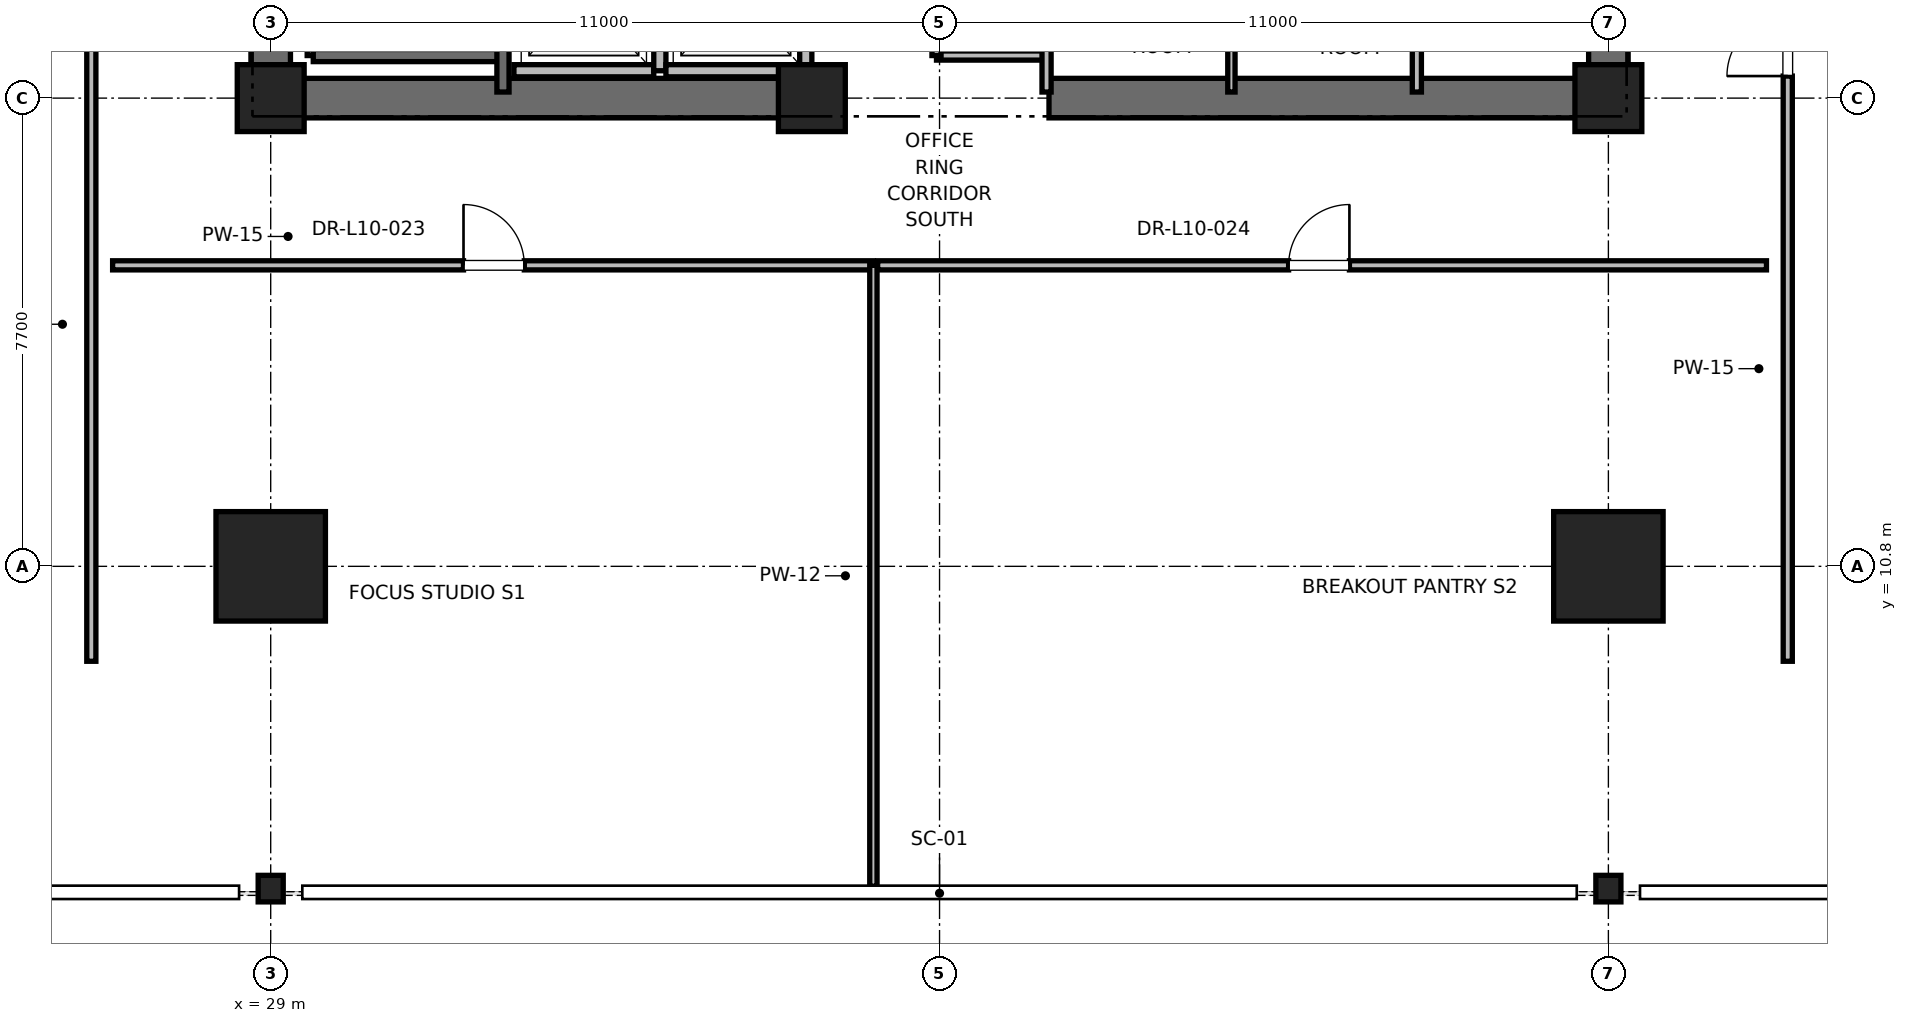
"""IFC4 building model, lengths in metres.
Left out: names, types, materials, properties, quantities, classifications, styles, units other than length and angle.
Written with IfcOpenShell. Run it as: python <this file> out.ifc"""

import sys

from ifc_helpers import new_model, si_unit, direction, frame, frame_2d, origin, origin_2d, place, context, subcontext, project, spatial, rectangle, i_section, extrude, element, fill, save


model = new_model("IFC4")
c1 = context("Model", 3, precision=1e-05, world=origin(), true_north=direction((0.0, 1.0)))
c2 = subcontext(c1, "Body", "Model", "MODEL_VIEW")
j1 = project(units=[si_unit("LENGTHUNIT", "METRE"), si_unit("PLANEANGLEUNIT", "RADIAN")], contexts=[c1])
p1 = place(None, origin())
s1 = spatial("IfcSite", under=j1, at=p1, CompositionType="ELEMENT")
p2 = place(p1, origin())
s2 = spatial("IfcBuilding", under=s1, at=p2, CompositionType="ELEMENT")
p3 = place(p2, frame((0.0, 0.0, 47.6)))
s3 = spatial("IfcBuildingStorey", under=s2, at=p3, CompositionType="ELEMENT", Elevation=47.6)
for number, where, z_axis, x_axis in (
    (1, (29.0, 10.8, 0.0), (0.0, 0.0, 1.0), (1.0, 0.0, 0.0)),
    (2, (51.0, 10.8, 0.0), (0.0, 0.0, 1.0), (1.0, 0.0, 0.0)),
):
    element("IfcColumn", number, at=place(p3, frame(where, z_axis=z_axis, x_axis=x_axis)), inside=s3, PredefinedType="COLUMN", context=c2, shape_type="SweptSolid", body=[
        extrude(rectangle(XDim=1.8, YDim=1.8, at=origin_2d()), origin(), (0.0, 0.0, 1.0), 4.0),
    ])
for number, where, z_axis, x_axis in (
    (3, (29.0, 5.5, 0.0), (0.0, 0.0, 1.0), (1.0, 0.0, 0.0)),
    (4, (51.0, 5.5, 0.0), (0.0, 0.0, 1.0), (1.0, 0.0, 0.0)),
):
    element("IfcColumn", number, at=place(p3, frame(where, z_axis=z_axis, x_axis=x_axis)), inside=s3, PredefinedType="COLUMN", context=c2, shape_type="SweptSolid", body=[
        extrude(i_section(OverallWidth=0.412, OverallDepth=0.437, WebThickness=0.036, FlangeThickness=0.058, FilletRadius=0.015, at=origin_2d()), origin(), (0.0, 0.0, 1.0), 4.0),
    ])
for number, where, z_axis, x_axis in (
    (5, (29.0, 18.5, 0.0), (0.0, 0.0, 1.0), (1.0, 0.0, 0.0)),
    (6, (51.0, 18.5, 0.0), (0.0, 0.0, 1.0), (1.0, 0.0, 0.0)),
    (7, (37.9, 18.5, 0.0), (0.0, 0.0, 1.0), (1.0, 0.0, 0.0)),
):
    element("IfcColumn", number, at=place(p3, frame(where, z_axis=z_axis, x_axis=x_axis)), inside=s3, PredefinedType="PILASTER", context=c2, shape_type="SweptSolid", body=[
        extrude(rectangle(XDim=1.1, YDim=1.1, at=origin_2d()), origin(), (0.0, 0.0, 1.0), 4.0),
    ])
for number, where, z_axis, x_axis in (
    (8, (29.0, 18.5, 0.0), (0.0, 0.0, 1.0), (1.0, 0.0, 0.0)),
    (9, (41.8, 18.5, 0.0), (0.0, 0.0, 1.0), (1.0, 0.0, 0.0)),
):
    element("IfcWall", number, at=place(p3, frame(where, z_axis=z_axis, x_axis=x_axis)), inside=s3, PredefinedType="SHEAR", context=c2, shape_type="SweptSolid", body=[
        extrude(rectangle(XDim=9.2, YDim=0.65, at=frame_2d((4.6, 0.0))), origin(), (0.0, 0.0, 1.0), 3.76),
    ])
p4 = place(p3, frame((29.0, 18.5, 0.0), z_axis=(0.0, 0.0, 1.0), x_axis=(0.0, 1.0, 0.0)))
e10 = element("IfcWall", 10, at=p4, inside=s3, PredefinedType="SHEAR", context=c2, shape_type="SweptSolid", body=[
    extrude(rectangle(XDim=8.8, YDim=0.65, at=frame_2d((4.4, 0.0))), origin(), (0.0, 0.0, 1.0), 3.76),
])
p5 = place(p3, frame((51.0, 18.5, 0.0), z_axis=(0.0, 0.0, 1.0), x_axis=(0.0, 1.0, 0.0)))
e11 = element("IfcWall", 11, at=p5, inside=s3, PredefinedType="SHEAR", context=c2, shape_type="SweptSolid", body=[
    extrude(rectangle(XDim=5.8, YDim=0.65, at=frame_2d((2.9, 0.0))), origin(), (0.0, 0.0, 1.0), 3.76),
])
p6 = place(p3, frame((29.7, 19.2, 0.0), z_axis=(0.0, 0.0, 1.0), x_axis=(0.0, 1.0, 0.0)))
e12 = element("IfcWall", 12, at=p6, inside=s3, PredefinedType="SOLIDWALL", context=c2, shape_type="SweptSolid", body=[
    extrude(rectangle(XDim=8.15, YDim=0.2, at=frame_2d((4.075, 0.0))), origin(), (0.0, 0.0, 1.0), 3.76),
])
p7 = place(p3, frame((29.7, 19.2, 0.0), z_axis=(0.0, 0.0, 1.0), x_axis=(1.0, 0.0, 0.0)))
e13 = element("IfcWall", 13, at=p7, inside=s3, PredefinedType="SOLIDWALL", context=c2, shape_type="SweptSolid", body=[
    extrude(rectangle(XDim=3.12, YDim=0.2, at=frame_2d((1.56, 0.0))), origin(), (0.0, 0.0, 1.0), 3.76),
])
p8 = place(p3, frame((32.82, 18.6, 0.0), z_axis=(0.0, 0.0, 1.0), x_axis=(0.0, 1.0, 0.0)))
e14 = element("IfcWall", 14, at=p8, inside=s3, PredefinedType="SOLIDWALL", context=c2, shape_type="SweptSolid", body=[
    extrude(rectangle(XDim=8.78, YDim=0.2, at=frame_2d((4.39, 0.0))), origin(), (0.0, 0.0, 1.0), 3.76),
])
p9 = place(p3, frame((33.0, 18.95, 0.0), z_axis=(0.0, 0.0, 1.0), x_axis=(1.0, 0.0, 0.0)))
e15 = element("IfcWall", 15, at=p9, inside=s3, PredefinedType="SOLIDWALL", context=c2, shape_type="SweptSolid", body=[
    extrude(rectangle(XDim=2.3, YDim=0.2, at=frame_2d((1.15, 0.0))), origin(), (0.0, 0.0, 1.0), 3.76),
])
p10 = place(p3, frame((35.4, 18.95, 0.0), z_axis=(0.0, 0.0, 1.0), x_axis=(0.0, 1.0, 0.0)))
e16 = element("IfcWall", 16, at=p10, inside=s3, PredefinedType="SOLIDWALL", context=c2, shape_type="SweptSolid", body=[
    extrude(rectangle(XDim=2.6, YDim=0.2, at=frame_2d((1.3, 0.0))), origin(), (0.0, 0.0, 1.0), 3.76),
])
p11 = place(p3, frame((35.5, 18.95, 0.0), z_axis=(0.0, 0.0, 1.0), x_axis=(1.0, 0.0, 0.0)))
e17 = element("IfcWall", 17, at=p11, inside=s3, PredefinedType="SOLIDWALL", context=c2, shape_type="SweptSolid", body=[
    extrude(rectangle(XDim=2.3, YDim=0.2, at=frame_2d((1.15, 0.0))), origin(), (0.0, 0.0, 1.0), 2.54),
])
p12 = place(p3, frame((37.8, 18.95, 0.0), z_axis=(0.0, 0.0, 1.0), x_axis=(0.0, 1.0, 0.0)))
e18 = element("IfcWall", 18, at=p12, inside=s3, PredefinedType="SOLIDWALL", context=c2, shape_type="SweptSolid", body=[
    extrude(rectangle(XDim=2.6, YDim=0.2, at=frame_2d((1.3, 0.0))), origin(), (0.0, 0.0, 1.0), 2.54),
])
p13 = place(p3, frame((39.95, 19.2, 0.0), z_axis=(0.0, 0.0, 1.0), x_axis=(1.0, 0.0, 0.0)))
e19 = element("IfcWall", 19, at=p13, inside=s3, PredefinedType="PARTITIONING", context=c2, shape_type="SweptSolid", body=[
    extrude(rectangle(XDim=1.81, YDim=0.15, at=frame_2d((0.905, 0.0))), origin(), (0.0, 0.0, 1.0), 2.85),
])
p14 = place(p3, frame((41.76, 18.6, 0.0), z_axis=(0.0, 0.0, 1.0), x_axis=(0.0, 1.0, 0.0)))
e20 = element("IfcWall", 20, at=p14, inside=s3, PredefinedType="PARTITIONING", context=c2, shape_type="SweptSolid", body=[
    extrude(rectangle(XDim=3.6, YDim=0.15, at=frame_2d((1.8, 0.0))), origin(), (0.0, 0.0, 1.0), 2.54),
])
p15 = place(p3, frame((39.95, 19.2, 0.0), z_axis=(0.0, 0.0, 1.0), x_axis=(0.0, 1.0, 0.0)))
e21 = element("IfcWall", 21, at=p15, inside=s3, PredefinedType="PARTITIONING", context=c2, shape_type="SweptSolid", body=[
    extrude(rectangle(XDim=3.0, YDim=0.15, at=frame_2d((1.5, 0.0))), origin(), (0.0, 0.0, 1.0), 2.85),
])
p16 = place(p15, frame((1.05, 0.0, 0.0)))
e22 = element("IfcOpeningElement", 22, at=p16, cuts=e21, PredefinedType="OPENING", context=c2, shape_type="SweptSolid", body=[
    extrude(rectangle(XDim=0.9, YDim=2.1, at=frame_2d((0.45, 1.05))), frame((0.0, 0.075, 0.0), z_axis=(0.0, -1.0, 0.0), x_axis=(1.0, 0.0, 0.0)), (0.0, 0.0, 1.0), 0.15),
])
p17 = place(p3, frame((47.85, 18.6, 0.0), z_axis=(0.0, 0.0, 1.0), x_axis=(0.0, 1.0, 0.0)))
e23 = element("IfcWall", 23, at=p17, inside=s3, PredefinedType="PARTITIONING", context=c2, shape_type="SweptSolid", body=[
    extrude(rectangle(XDim=2.54, YDim=0.15, at=frame_2d((1.27, 0.0))), origin(), (0.0, 0.0, 1.0), 2.85),
])
p18 = place(p3, frame((44.8, 18.6, 0.0), z_axis=(0.0, 0.0, 1.0), x_axis=(0.0, 1.0, 0.0)))
e24 = element("IfcWall", 24, at=p18, inside=s3, PredefinedType="PARTITIONING", context=c2, shape_type="SweptSolid", body=[
    extrude(rectangle(XDim=3.02, YDim=0.12, at=frame_2d((1.51, 0.0))), origin(), (0.0, 0.0, 1.0), 2.85),
])
p19 = place(p3, frame((26.4, 15.75, 0.0), z_axis=(0.0, 0.0, 1.0), x_axis=(1.0, 0.0, 0.0)))
e25 = element("IfcWall", 25, at=p19, inside=s3, PredefinedType="PARTITIONING", context=c2, shape_type="SweptSolid", body=[
    extrude(rectangle(XDim=12.512, YDim=0.15, at=frame_2d((6.256, 0.0))), origin(), (0.0, 0.0, 1.0), 2.85),
])
p20 = place(p19, frame((5.771, 0.0, 0.0)))
e26 = element("IfcOpeningElement", 26, at=p20, cuts=e25, PredefinedType="OPENING", context=c2, shape_type="SweptSolid", body=[
    extrude(rectangle(XDim=1.0, YDim=2.15, at=frame_2d((0.5, 1.075))), frame((0.0, 0.075, 0.0), z_axis=(0.0, -1.0, 0.0), x_axis=(1.0, 0.0, 0.0)), (0.0, 0.0, 1.0), 0.15),
])
p21 = place(p3, frame((38.912, 5.539, 0.0), z_axis=(0.0, 0.0, 1.0), x_axis=(0.0, 1.0, 0.0)))
e27 = element("IfcWall", 27, at=p21, inside=s3, PredefinedType="PARTITIONING", context=c2, shape_type="SweptSolid", body=[
    extrude(rectangle(XDim=10.211, YDim=0.12, at=frame_2d((5.105, 0.0))), origin(), (0.0, 0.0, 1.0), 2.39),
])
p22 = place(p3, frame((38.982, 15.75, 0.0), z_axis=(0.0, 0.0, 1.0), x_axis=(1.0, 0.0, 0.0)))
e28 = element("IfcWall", 28, at=p22, inside=s3, PredefinedType="PARTITIONING", context=c2, shape_type="SweptSolid", body=[
    extrude(rectangle(XDim=14.618, YDim=0.15, at=frame_2d((7.309, 0.0))), origin(), (0.0, 0.0, 1.0), 2.85),
])
p23 = place(p22, frame((6.759, 0.0, 0.0)))
e29 = element("IfcOpeningElement", 29, at=p23, cuts=e28, PredefinedType="OPENING", context=c2, shape_type="SweptSolid", body=[
    extrude(rectangle(XDim=1.0, YDim=2.15, at=frame_2d((0.5, 1.075))), frame((0.0, 0.075, 0.0), z_axis=(0.0, -1.0, 0.0), x_axis=(1.0, 0.0, 0.0)), (0.0, 0.0, 1.0), 0.15),
])
p24 = place(p3, frame((26.05, 9.239, 0.0), z_axis=(0.0, 0.0, 1.0), x_axis=(0.0, 1.0, 0.0)))
e30 = element("IfcWall", 30, at=p24, inside=s3, PredefinedType="PARTITIONING", context=c2, shape_type="SweptSolid", body=[
    extrude(rectangle(XDim=13.878, YDim=0.15, at=frame_2d((6.939, 0.0))), origin(), (0.0, 0.0, 1.0), 2.85),
])
p25 = place(p24, frame((11.085, 0.0, 0.0)))
e31 = element("IfcOpeningElement", 31, at=p25, cuts=e30, PredefinedType="OPENING", context=c2, shape_type="SweptSolid", body=[
    extrude(rectangle(XDim=1.0, YDim=2.15, at=frame_2d((0.5, 1.075))), frame((0.0, 0.075, 0.0), z_axis=(0.0, -1.0, 0.0), x_axis=(1.0, 0.0, 0.0)), (0.0, 0.0, 1.0), 0.15),
])
p26 = place(p3, frame((53.95, 9.239, 0.0), z_axis=(0.0, 0.0, 1.0), x_axis=(0.0, 1.0, 0.0)))
e32 = element("IfcWall", 32, at=p26, inside=s3, PredefinedType="PARTITIONING", context=c2, shape_type="SweptSolid", body=[
    extrude(rectangle(XDim=10.957, YDim=0.15, at=frame_2d((5.479, 0.0))), origin(), (0.0, 0.0, 1.0), 2.85),
])
p27 = place(p26, frame((9.624, 0.0, 0.0)))
e33 = element("IfcOpeningElement", 33, at=p27, cuts=e32, PredefinedType="OPENING", context=c2, shape_type="SweptSolid", body=[
    extrude(rectangle(XDim=1.0, YDim=2.15, at=frame_2d((0.5, 1.075))), frame((0.0, 0.075, 0.0), z_axis=(0.0, -1.0, 0.0), x_axis=(1.0, 0.0, 0.0)), (0.0, 0.0, 1.0), 0.15),
])
p28 = place(p20, origin())
e34 = element("IfcDoor", 34, at=p28, inside=s3, OperationType="SINGLE_SWING_LEFT", PredefinedType="DOOR", context=c2, shape_type="SweptSolid", body=[
    extrude(rectangle(XDim=1.0, YDim=2.15, at=frame_2d((0.5, 1.075))), frame((0.0, 0.025, 0.0), z_axis=(0.0, -1.0, 0.0), x_axis=(1.0, 0.0, 0.0)), (0.0, 0.0, 1.0), 0.05),
])
fill(e26, e34)
p29 = place(p23, origin())
e35 = element("IfcDoor", 35, at=p29, inside=s3, OperationType="SINGLE_SWING_RIGHT", PredefinedType="DOOR", context=c2, shape_type="SweptSolid", body=[
    extrude(rectangle(XDim=1.0, YDim=2.15, at=frame_2d((0.5, 1.075))), frame((0.0, 0.025, 0.0), z_axis=(0.0, -1.0, 0.0), x_axis=(1.0, 0.0, 0.0)), (0.0, 0.0, 1.0), 0.05),
])
fill(e29, e35)
p30 = place(p27, origin())
e36 = element("IfcDoor", 36, at=p30, inside=s3, OperationType="SINGLE_SWING_LEFT", PredefinedType="DOOR", context=c2, shape_type="SweptSolid", body=[
    extrude(rectangle(XDim=1.0, YDim=2.15, at=frame_2d((0.5, 1.075))), frame((0.0, 0.025, 0.0), z_axis=(0.0, -1.0, 0.0), x_axis=(1.0, 0.0, 0.0)), (0.0, 0.0, 1.0), 0.05),
])
fill(e33, e36)
save(model, sys.argv[1])
